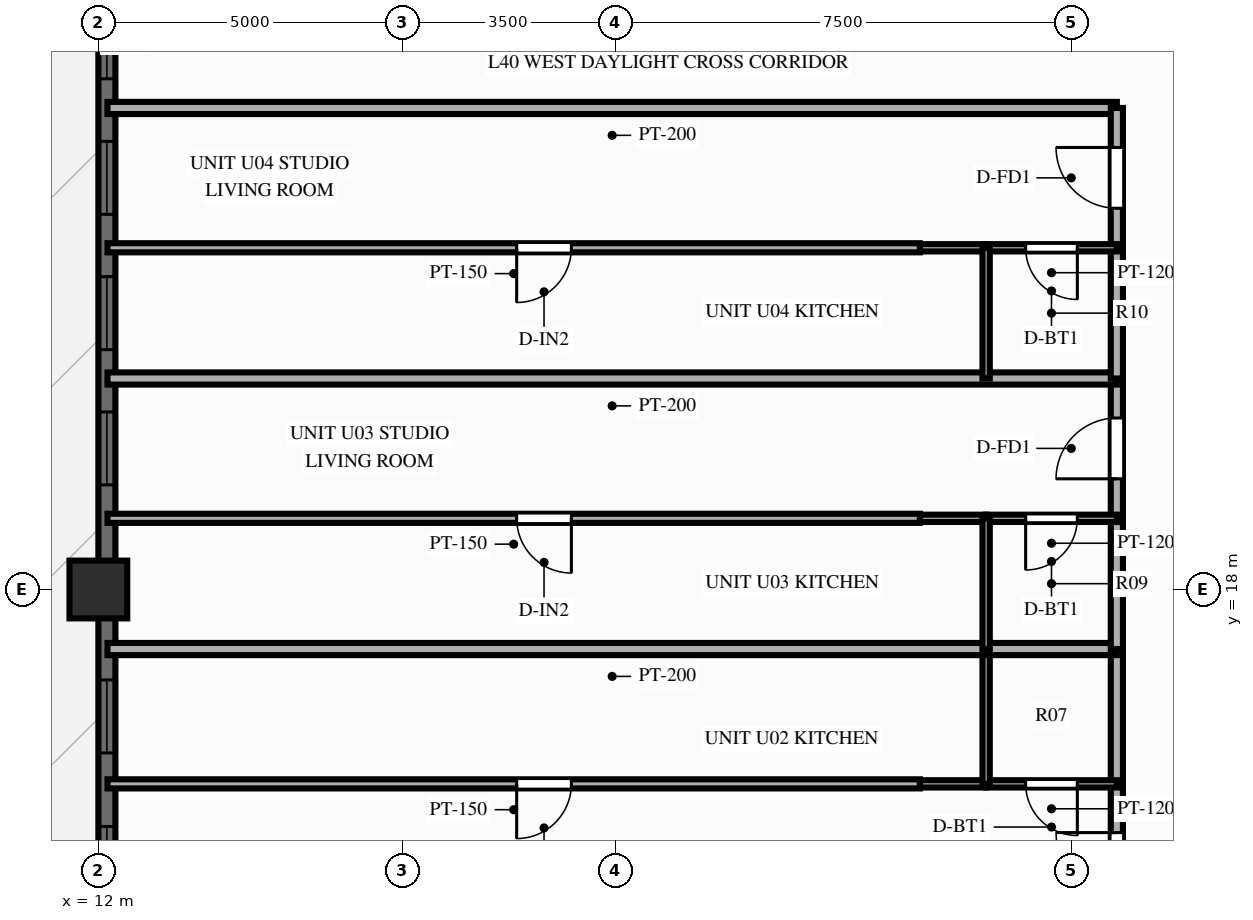
"""IFC4 building model, lengths in metres.
Left out: names, types, materials, properties, quantities, classifications, styles, units other than length and angle.
Written with IfcOpenShell. Run it as: python <this file> out.ifc"""

import sys

from ifc_helpers import new_model, si_unit, direction, frame, frame_2d, origin, origin_2d, place, context, subcontext, project, spatial, rectangle, extrude, source, transform, mapped, element, fill, save


model = new_model("IFC4")
c1 = context("Model", 3, precision=1e-05, world=origin(), true_north=direction((0.0, 1.0)))
c2 = subcontext(c1, "Body", "Model", "MODEL_VIEW")
j1 = project(units=[si_unit("LENGTHUNIT", "METRE"), si_unit("PLANEANGLEUNIT", "RADIAN")], contexts=[c1])
p1 = place(None, origin())
s1 = spatial("IfcSite", under=j1, at=p1, CompositionType="ELEMENT")
p2 = place(p1, origin())
s2 = spatial("IfcBuilding", under=s1, at=p2, CompositionType="ELEMENT")
p3 = place(p2, frame((0.0, 0.0, 126.75)))
s3 = spatial("IfcBuildingStorey", under=s2, at=p3, CompositionType="ELEMENT", Elevation=126.75)
m1 = source(origin(), c2, "Body", "SweptSolid", [
    extrude(rectangle(XDim=0.95, YDim=0.95, at=origin_2d()), origin(), (0.0, 0.0, 1.0), 3.0),
])
p4 = place(p3, frame((12.0, 18.0, 0.0), z_axis=(0.0, 0.0, 1.0), x_axis=(1.0, 0.0, 0.0)))
e1 = element("IfcColumn", 1, at=p4, inside=s3, PredefinedType="COLUMN", context=c2, shape_type="MappedRepresentation", body=[
    mapped(m1, transform((0.0, 0.0, 0.0), scale=1.0)),
])
p5 = place(p3, frame((12.14, 7.2, 0.0), z_axis=(0.0, 0.0, 1.0), x_axis=(0.0, 1.0, 0.0)))
e2 = element("IfcWall", 2, at=p5, inside=s3, PredefinedType="SOLIDWALL", context=c2, shape_type="SweptSolid", body=[
    extrude(rectangle(XDim=39.6, YDim=0.28, at=frame_2d((19.8, 0.0))), origin(), (0.0, 0.0, 1.0), 2.28),
])
p6 = place(p5, frame((0.949, 0.0, 0.25)))
e3 = element("IfcOpeningElement", 3, at=p6, cuts=e2, PredefinedType="OPENING", context=c2, shape_type="SweptSolid", body=[
    extrude(rectangle(XDim=1.2, YDim=1.5, at=frame_2d((0.6, 0.75))), frame((0.0, 0.152, 0.0), z_axis=(0.0, -1.0, 0.0), x_axis=(1.0, 0.0, 0.0)), (0.0, 0.0, 1.0), 0.304),
])
p7 = place(p5, frame((3.292, 0.0, 0.25)))
e4 = element("IfcOpeningElement", 4, at=p7, cuts=e2, PredefinedType="OPENING", context=c2, shape_type="SweptSolid", body=[
    extrude(rectangle(XDim=1.2, YDim=1.5, at=frame_2d((0.6, 0.75))), frame((0.0, 0.152, 0.0), z_axis=(0.0, -1.0, 0.0), x_axis=(1.0, 0.0, 0.0)), (0.0, 0.0, 1.0), 0.304),
])
p8 = place(p5, frame((5.702, 0.0, 0.25)))
e5 = element("IfcOpeningElement", 5, at=p8, cuts=e2, PredefinedType="OPENING", context=c2, shape_type="SweptSolid", body=[
    extrude(rectangle(XDim=1.2, YDim=1.5, at=frame_2d((0.6, 0.75))), frame((0.0, 0.152, 0.0), z_axis=(0.0, -1.0, 0.0), x_axis=(1.0, 0.0, 0.0)), (0.0, 0.0, 1.0), 0.304),
])
p9 = place(p5, frame((8.112, 0.0, 0.25)))
e6 = element("IfcOpeningElement", 6, at=p9, cuts=e2, PredefinedType="OPENING", context=c2, shape_type="SweptSolid", body=[
    extrude(rectangle(XDim=1.2, YDim=1.5, at=frame_2d((0.6, 0.75))), frame((0.0, 0.152, 0.0), z_axis=(0.0, -1.0, 0.0), x_axis=(1.0, 0.0, 0.0)), (0.0, 0.0, 1.0), 0.304),
])
p10 = place(p5, frame((12.521, 0.0, 0.25)))
e7 = element("IfcOpeningElement", 7, at=p10, cuts=e2, PredefinedType="OPENING", context=c2, shape_type="SweptSolid", body=[
    extrude(rectangle(XDim=1.2, YDim=1.5, at=frame_2d((0.6, 0.75))), frame((0.0, 0.152, 0.0), z_axis=(0.0, -1.0, 0.0), x_axis=(1.0, 0.0, 0.0)), (0.0, 0.0, 1.0), 0.304),
])
p11 = place(p5, frame((14.745, 0.0, 0.25)))
e8 = element("IfcOpeningElement", 8, at=p11, cuts=e2, PredefinedType="OPENING", context=c2, shape_type="SweptSolid", body=[
    extrude(rectangle(XDim=1.2, YDim=1.5, at=frame_2d((0.6, 0.75))), frame((0.0, 0.152, 0.0), z_axis=(0.0, -1.0, 0.0), x_axis=(1.0, 0.0, 0.0)), (0.0, 0.0, 1.0), 0.304),
])
p12 = place(p5, frame((16.97, 0.0, 0.25)))
e9 = element("IfcOpeningElement", 9, at=p12, cuts=e2, PredefinedType="OPENING", context=c2, shape_type="SweptSolid", body=[
    extrude(rectangle(XDim=1.2, YDim=1.5, at=frame_2d((0.6, 0.75))), frame((0.0, 0.152, 0.0), z_axis=(0.0, -1.0, 0.0), x_axis=(1.0, 0.0, 0.0)), (0.0, 0.0, 1.0), 0.304),
])
p13 = place(p5, frame((19.2, 0.0, 0.25)))
e10 = element("IfcOpeningElement", 10, at=p13, cuts=e2, PredefinedType="OPENING", context=c2, shape_type="SweptSolid", body=[
    extrude(rectangle(XDim=1.2, YDim=1.5, at=frame_2d((0.6, 0.75))), frame((0.0, 0.152, 0.0), z_axis=(0.0, -1.0, 0.0), x_axis=(1.0, 0.0, 0.0)), (0.0, 0.0, 1.0), 0.304),
])
p14 = place(p5, frame((21.578, 0.0, 0.25)))
e11 = element("IfcOpeningElement", 11, at=p14, cuts=e2, PredefinedType="OPENING", context=c2, shape_type="SweptSolid", body=[
    extrude(rectangle(XDim=1.2, YDim=1.5, at=frame_2d((0.6, 0.75))), frame((0.0, 0.152, 0.0), z_axis=(0.0, -1.0, 0.0), x_axis=(1.0, 0.0, 0.0)), (0.0, 0.0, 1.0), 0.304),
])
p15 = place(p5, frame((24.713, 0.0, 0.0)))
e12 = element("IfcOpeningElement", 12, at=p15, cuts=e2, PredefinedType="OPENING", context=c2, shape_type="SweptSolid", body=[
    extrude(rectangle(XDim=1.6, YDim=2.15, at=frame_2d((0.8, 1.075))), frame((0.0, 0.152, 0.0), z_axis=(0.0, -1.0, 0.0), x_axis=(1.0, 0.0, 0.0)), (0.0, 0.0, 1.0), 0.304),
])
p16 = place(p5, frame((29.305, 0.0, 0.25)))
e13 = element("IfcOpeningElement", 13, at=p16, cuts=e2, PredefinedType="OPENING", context=c2, shape_type="SweptSolid", body=[
    extrude(rectangle(XDim=0.7, YDim=1.5, at=frame_2d((0.35, 0.75))), frame((0.0, 0.152, 0.0), z_axis=(0.0, -1.0, 0.0), x_axis=(1.0, 0.0, 0.0)), (0.0, 0.0, 1.0), 0.304),
])
p17 = place(p5, frame((30.848, 0.0, 0.25)))
e14 = element("IfcOpeningElement", 14, at=p17, cuts=e2, PredefinedType="OPENING", context=c2, shape_type="SweptSolid", body=[
    extrude(rectangle(XDim=1.2, YDim=1.5, at=frame_2d((0.6, 0.75))), frame((0.0, 0.152, 0.0), z_axis=(0.0, -1.0, 0.0), x_axis=(1.0, 0.0, 0.0)), (0.0, 0.0, 1.0), 0.304),
])
p18 = place(p5, frame((34.183, 0.0, 0.25)))
e15 = element("IfcOpeningElement", 15, at=p18, cuts=e2, PredefinedType="OPENING", context=c2, shape_type="SweptSolid", body=[
    extrude(rectangle(XDim=1.2, YDim=1.5, at=frame_2d((0.6, 0.75))), frame((0.0, 0.152, 0.0), z_axis=(0.0, -1.0, 0.0), x_axis=(1.0, 0.0, 0.0)), (0.0, 0.0, 1.0), 0.304),
])
p19 = place(p5, frame((37.452, 0.0, 0.25)))
e16 = element("IfcOpeningElement", 16, at=p19, cuts=e2, PredefinedType="OPENING", context=c2, shape_type="SweptSolid", body=[
    extrude(rectangle(XDim=1.2, YDim=1.5, at=frame_2d((0.6, 0.75))), frame((0.0, 0.152, 0.0), z_axis=(0.0, -1.0, 0.0), x_axis=(1.0, 0.0, 0.0)), (0.0, 0.0, 1.0), 0.304),
])
p20 = place(p3, frame((28.75, 25.92, 0.0), z_axis=(0.0, 0.0, 1.0), x_axis=(-1.0, 0.0, 0.0)))
e17 = element("IfcWall", 17, at=p20, inside=s3, PredefinedType="PARTITIONING", context=c2, shape_type="SweptSolid", body=[
    extrude(rectangle(XDim=16.6, YDim=0.2, at=frame_2d((8.3, 0.0))), origin(), (0.0, 0.0, 1.0), 2.79),
])
p21 = place(p3, frame((28.75, 12.2, 0.0), z_axis=(0.0, 0.0, 1.0), x_axis=(0.0, 1.0, 0.0)))
e18 = element("IfcWall", 18, at=p21, inside=s3, PredefinedType="PARTITIONING", context=c2, shape_type="SweptSolid", body=[
    extrude(rectangle(XDim=2.603, YDim=0.2, at=frame_2d((1.302, 0.0))), origin(), (0.0, 0.0, 1.0), 2.79),
])
p22 = place(p21, frame((0.802, 0.0, 0.0)))
e19 = element("IfcOpeningElement", 19, at=p22, cuts=e18, PredefinedType="OPENING", context=c2, shape_type="SweptSolid", body=[
    extrude(rectangle(XDim=1.0, YDim=2.15, at=frame_2d((0.5, 1.075))), frame((0.0, 0.112, 0.0), z_axis=(0.0, -1.0, 0.0), x_axis=(1.0, 0.0, 0.0)), (0.0, 0.0, 1.0), 0.224),
])
p23 = place(p3, frame((28.75, 14.803, 0.0), z_axis=(0.0, 0.0, 1.0), x_axis=(0.0, 1.0, 0.0)))
e20 = element("IfcWall", 20, at=p23, inside=s3, PredefinedType="PARTITIONING", context=c2, shape_type="SweptSolid", body=[
    extrude(rectangle(XDim=2.217, YDim=0.2, at=frame_2d((1.109, 0.0))), origin(), (0.0, 0.0, 1.0), 2.79),
])
p24 = place(p3, frame((28.75, 14.803, 0.0), z_axis=(0.0, 0.0, 1.0), x_axis=(-1.0, 0.0, 0.0)))
e21 = element("IfcWall", 21, at=p24, inside=s3, PredefinedType="PARTITIONING", context=c2, shape_type="SweptSolid", body=[
    extrude(rectangle(XDim=2.15, YDim=0.12, at=frame_2d((1.075, 0.0))), origin(), (0.0, 0.0, 1.0), 2.79),
])
p25 = place(p24, frame((0.65, 0.0, 0.0)))
e22 = element("IfcOpeningElement", 22, at=p25, cuts=e21, PredefinedType="OPENING", context=c2, shape_type="SweptSolid", body=[
    extrude(rectangle(XDim=0.85, YDim=2.05, at=frame_2d((0.425, 1.025))), frame((0.0, 0.072, 0.0), z_axis=(0.0, -1.0, 0.0), x_axis=(1.0, 0.0, 0.0)), (0.0, 0.0, 1.0), 0.144),
])
p26 = place(p3, frame((26.6, 14.803, 0.0), z_axis=(0.0, 0.0, 1.0), x_axis=(-1.0, 0.0, 0.0)))
e23 = element("IfcWall", 23, at=p26, inside=s3, PredefinedType="PARTITIONING", context=c2, shape_type="SweptSolid", body=[
    extrude(rectangle(XDim=1.09, YDim=0.12, at=frame_2d((0.545, 0.0))), origin(), (0.0, 0.0, 1.0), 2.79),
])
p27 = place(p3, frame((26.6, 14.803, 0.0), z_axis=(0.0, 0.0, 1.0), x_axis=(0.0, 1.0, 0.0)))
e24 = element("IfcWall", 24, at=p27, inside=s3, PredefinedType="PARTITIONING", context=c2, shape_type="SweptSolid", body=[
    extrude(rectangle(XDim=2.217, YDim=0.12, at=frame_2d((1.109, 0.0))), origin(), (0.0, 0.0, 1.0), 2.79),
])
p28 = place(p3, frame((25.51, 14.803, 0.0), z_axis=(0.0, 0.0, 1.0), x_axis=(-1.0, 0.0, 0.0)))
e25 = element("IfcWall", 25, at=p28, inside=s3, PredefinedType="PARTITIONING", context=c2, shape_type="SweptSolid", body=[
    extrude(rectangle(XDim=13.36, YDim=0.15, at=frame_2d((6.68, 0.0))), origin(), (0.0, 0.0, 1.0), 2.79),
])
p29 = place(p28, frame((5.731, 0.0, 0.0)))
e26 = element("IfcOpeningElement", 26, at=p29, cuts=e25, PredefinedType="OPENING", context=c2, shape_type="SweptSolid", body=[
    extrude(rectangle(XDim=0.9, YDim=2.1, at=frame_2d((0.45, 1.05))), frame((0.0, 0.087, 0.0), z_axis=(0.0, -1.0, 0.0), x_axis=(1.0, 0.0, 0.0)), (0.0, 0.0, 1.0), 0.174),
])
p30 = place(p3, frame((28.75, 17.021, 0.0), z_axis=(0.0, 0.0, 1.0), x_axis=(-1.0, 0.0, 0.0)))
e27 = element("IfcWall", 27, at=p30, inside=s3, PredefinedType="PARTITIONING", context=c2, shape_type="SweptSolid", body=[
    extrude(rectangle(XDim=16.6, YDim=0.2, at=frame_2d((8.3, 0.0))), origin(), (0.0, 0.0, 1.0), 2.34),
])
p31 = place(p3, frame((28.75, 17.021, 0.0), z_axis=(0.0, 0.0, 1.0), x_axis=(0.0, 1.0, 0.0)))
e28 = element("IfcWall", 28, at=p31, inside=s3, PredefinedType="PARTITIONING", context=c2, shape_type="SweptSolid", body=[
    extrude(rectangle(XDim=2.15, YDim=0.2, at=frame_2d((1.075, 0.0))), origin(), (0.0, 0.0, 1.0), 2.79),
])
p32 = place(p3, frame((28.75, 19.171, 0.0), z_axis=(0.0, 0.0, 1.0), x_axis=(0.0, 1.0, 0.0)))
e29 = element("IfcWall", 29, at=p32, inside=s3, PredefinedType="PARTITIONING", context=c2, shape_type="SweptSolid", body=[
    extrude(rectangle(XDim=2.3, YDim=0.2, at=frame_2d((1.15, 0.0))), origin(), (0.0, 0.0, 1.0), 2.79),
])
p33 = place(p32, frame((0.65, 0.0, 0.0)))
e30 = element("IfcOpeningElement", 30, at=p33, cuts=e29, PredefinedType="OPENING", context=c2, shape_type="SweptSolid", body=[
    extrude(rectangle(XDim=1.0, YDim=2.15, at=frame_2d((0.5, 1.075))), frame((0.0, 0.112, 0.0), z_axis=(0.0, -1.0, 0.0), x_axis=(1.0, 0.0, 0.0)), (0.0, 0.0, 1.0), 0.224),
])
p34 = place(p3, frame((28.75, 19.171, 0.0), z_axis=(0.0, 0.0, 1.0), x_axis=(-1.0, 0.0, 0.0)))
e31 = element("IfcWall", 31, at=p34, inside=s3, PredefinedType="PARTITIONING", context=c2, shape_type="SweptSolid", body=[
    extrude(rectangle(XDim=2.15, YDim=0.12, at=frame_2d((1.075, 0.0))), origin(), (0.0, 0.0, 1.0), 2.79),
])
p35 = place(p34, frame((0.65, 0.0, 0.0)))
e32 = element("IfcOpeningElement", 32, at=p35, cuts=e31, PredefinedType="OPENING", context=c2, shape_type="SweptSolid", body=[
    extrude(rectangle(XDim=0.85, YDim=2.05, at=frame_2d((0.425, 1.025))), frame((0.0, 0.072, 0.0), z_axis=(0.0, -1.0, 0.0), x_axis=(1.0, 0.0, 0.0)), (0.0, 0.0, 1.0), 0.144),
])
p36 = place(p3, frame((26.6, 19.171, 0.0), z_axis=(0.0, 0.0, 1.0), x_axis=(-1.0, 0.0, 0.0)))
e33 = element("IfcWall", 33, at=p36, inside=s3, PredefinedType="PARTITIONING", context=c2, shape_type="SweptSolid", body=[
    extrude(rectangle(XDim=1.09, YDim=0.12, at=frame_2d((0.545, 0.0))), origin(), (0.0, 0.0, 1.0), 2.79),
])
p37 = place(p3, frame((26.6, 17.021, 0.0), z_axis=(0.0, 0.0, 1.0), x_axis=(0.0, 1.0, 0.0)))
e34 = element("IfcWall", 34, at=p37, inside=s3, PredefinedType="PARTITIONING", context=c2, shape_type="SweptSolid", body=[
    extrude(rectangle(XDim=2.15, YDim=0.12, at=frame_2d((1.075, 0.0))), origin(), (0.0, 0.0, 1.0), 2.79),
])
p38 = place(p3, frame((25.51, 19.171, 0.0), z_axis=(0.0, 0.0, 1.0), x_axis=(-1.0, 0.0, 0.0)))
e35 = element("IfcWall", 35, at=p38, inside=s3, PredefinedType="PARTITIONING", context=c2, shape_type="SweptSolid", body=[
    extrude(rectangle(XDim=13.36, YDim=0.15, at=frame_2d((6.68, 0.0))), origin(), (0.0, 0.0, 1.0), 2.79),
])
p39 = place(p38, frame((5.731, 0.0, 0.0)))
e36 = element("IfcOpeningElement", 36, at=p39, cuts=e35, PredefinedType="OPENING", context=c2, shape_type="SweptSolid", body=[
    extrude(rectangle(XDim=0.9, YDim=2.1, at=frame_2d((0.45, 1.05))), frame((0.0, 0.087, 0.0), z_axis=(0.0, -1.0, 0.0), x_axis=(1.0, 0.0, 0.0)), (0.0, 0.0, 1.0), 0.174),
])
p40 = place(p3, frame((28.75, 21.47, 0.0), z_axis=(0.0, 0.0, 1.0), x_axis=(-1.0, 0.0, 0.0)))
e37 = element("IfcWall", 37, at=p40, inside=s3, PredefinedType="PARTITIONING", context=c2, shape_type="SweptSolid", body=[
    extrude(rectangle(XDim=16.6, YDim=0.2, at=frame_2d((8.3, 0.0))), origin(), (0.0, 0.0, 1.0), 2.79),
])
p41 = place(p3, frame((28.75, 21.47, 0.0), z_axis=(0.0, 0.0, 1.0), x_axis=(0.0, 1.0, 0.0)))
e38 = element("IfcWall", 38, at=p41, inside=s3, PredefinedType="PARTITIONING", context=c2, shape_type="SweptSolid", body=[
    extrude(rectangle(XDim=2.15, YDim=0.2, at=frame_2d((1.075, 0.0))), origin(), (0.0, 0.0, 1.0), 2.79),
])
p42 = place(p3, frame((28.75, 23.62, 0.0), z_axis=(0.0, 0.0, 1.0), x_axis=(0.0, 1.0, 0.0)))
e39 = element("IfcWall", 39, at=p42, inside=s3, PredefinedType="PARTITIONING", context=c2, shape_type="SweptSolid", body=[
    extrude(rectangle(XDim=2.3, YDim=0.2, at=frame_2d((1.15, 0.0))), origin(), (0.0, 0.0, 1.0), 2.79),
])
p43 = place(p42, frame((0.65, 0.0, 0.0)))
e40 = element("IfcOpeningElement", 40, at=p43, cuts=e39, PredefinedType="OPENING", context=c2, shape_type="SweptSolid", body=[
    extrude(rectangle(XDim=1.0, YDim=2.15, at=frame_2d((0.5, 1.075))), frame((0.0, 0.112, 0.0), z_axis=(0.0, -1.0, 0.0), x_axis=(1.0, 0.0, 0.0)), (0.0, 0.0, 1.0), 0.224),
])
p44 = place(p3, frame((28.75, 23.62, 0.0), z_axis=(0.0, 0.0, 1.0), x_axis=(-1.0, 0.0, 0.0)))
e41 = element("IfcWall", 41, at=p44, inside=s3, PredefinedType="PARTITIONING", context=c2, shape_type="SweptSolid", body=[
    extrude(rectangle(XDim=2.15, YDim=0.12, at=frame_2d((1.075, 0.0))), origin(), (0.0, 0.0, 1.0), 2.79),
])
p45 = place(p44, frame((0.65, 0.0, 0.0)))
e42 = element("IfcOpeningElement", 42, at=p45, cuts=e41, PredefinedType="OPENING", context=c2, shape_type="SweptSolid", body=[
    extrude(rectangle(XDim=0.85, YDim=2.05, at=frame_2d((0.425, 1.025))), frame((0.0, 0.072, 0.0), z_axis=(0.0, -1.0, 0.0), x_axis=(1.0, 0.0, 0.0)), (0.0, 0.0, 1.0), 0.144),
])
p46 = place(p3, frame((26.6, 23.62, 0.0), z_axis=(0.0, 0.0, 1.0), x_axis=(-1.0, 0.0, 0.0)))
e43 = element("IfcWall", 43, at=p46, inside=s3, PredefinedType="PARTITIONING", context=c2, shape_type="SweptSolid", body=[
    extrude(rectangle(XDim=1.09, YDim=0.12, at=frame_2d((0.545, 0.0))), origin(), (0.0, 0.0, 1.0), 2.79),
])
p47 = place(p3, frame((26.6, 21.47, 0.0), z_axis=(0.0, 0.0, 1.0), x_axis=(0.0, 1.0, 0.0)))
e44 = element("IfcWall", 44, at=p47, inside=s3, PredefinedType="PARTITIONING", context=c2, shape_type="SweptSolid", body=[
    extrude(rectangle(XDim=2.15, YDim=0.12, at=frame_2d((1.075, 0.0))), origin(), (0.0, 0.0, 1.0), 2.79),
])
p48 = place(p3, frame((25.51, 23.62, 0.0), z_axis=(0.0, 0.0, 1.0), x_axis=(-1.0, 0.0, 0.0)))
e45 = element("IfcWall", 45, at=p48, inside=s3, PredefinedType="PARTITIONING", context=c2, shape_type="SweptSolid", body=[
    extrude(rectangle(XDim=13.36, YDim=0.15, at=frame_2d((6.68, 0.0))), origin(), (0.0, 0.0, 1.0), 2.79),
])
p49 = place(p48, frame((5.731, 0.0, 0.0)))
e46 = element("IfcOpeningElement", 46, at=p49, cuts=e45, PredefinedType="OPENING", context=c2, shape_type="SweptSolid", body=[
    extrude(rectangle(XDim=0.9, YDim=2.1, at=frame_2d((0.45, 1.05))), frame((0.0, 0.087, 0.0), z_axis=(0.0, -1.0, 0.0), x_axis=(1.0, 0.0, 0.0)), (0.0, 0.0, 1.0), 0.174),
])
m2 = source(origin(), c2, "Body", "SweptSolid", [
    extrude(rectangle(XDim=1.2, YDim=1.5, at=frame_2d((0.6, 0.75))), frame((0.0, 0.03, 0.0), z_axis=(0.0, -1.0, 0.0), x_axis=(1.0, 0.0, 0.0)), (0.0, 0.0, 1.0), 0.06),
])
p50 = place(p8, origin())
e47 = element("IfcWindow", 47, at=p50, inside=s3, PartitioningType="SINGLE_PANEL", PredefinedType="WINDOW", context=c2, shape_type="MappedRepresentation", body=[
    mapped(m2, transform((0.0, 0.0, 0.0), scale=1.0)),
])
fill(e5, e47)
p51 = place(p9, origin())
e48 = element("IfcWindow", 48, at=p51, inside=s3, PartitioningType="SINGLE_PANEL", PredefinedType="WINDOW", context=c2, shape_type="MappedRepresentation", body=[
    mapped(m2, transform((0.0, 0.0, 0.0), scale=1.0)),
])
fill(e6, e48)
p52 = place(p10, origin())
e49 = element("IfcWindow", 49, at=p52, inside=s3, PartitioningType="SINGLE_PANEL", PredefinedType="WINDOW", context=c2, shape_type="MappedRepresentation", body=[
    mapped(m2, transform((0.0, 0.0, 0.0), scale=1.0)),
])
fill(e7, e49)
p53 = place(p11, origin())
e50 = element("IfcWindow", 50, at=p53, inside=s3, PartitioningType="SINGLE_PANEL", PredefinedType="WINDOW", context=c2, shape_type="MappedRepresentation", body=[
    mapped(m2, transform((0.0, 0.0, 0.0), scale=1.0)),
])
fill(e8, e50)
p54 = place(p12, origin())
e51 = element("IfcWindow", 51, at=p54, inside=s3, PartitioningType="SINGLE_PANEL", PredefinedType="WINDOW", context=c2, shape_type="MappedRepresentation", body=[
    mapped(m2, transform((0.0, 0.0, 0.0), scale=1.0)),
])
fill(e9, e51)
p55 = place(p13, origin())
e52 = element("IfcWindow", 52, at=p55, inside=s3, PartitioningType="SINGLE_PANEL", PredefinedType="WINDOW", context=c2, shape_type="MappedRepresentation", body=[
    mapped(m2, transform((0.0, 0.0, 0.0), scale=1.0)),
])
fill(e10, e52)
m3 = source(origin(), c2, "Body", "SweptSolid", [
    extrude(rectangle(XDim=1.0, YDim=2.15, at=frame_2d((0.5, 1.075))), frame((0.0, 0.025, 0.0), z_axis=(0.0, -1.0, 0.0), x_axis=(1.0, 0.0, 0.0)), (0.0, 0.0, 1.0), 0.05),
])
p56 = place(p22, origin())
e53 = element("IfcDoor", 53, at=p56, inside=s3, OperationType="SINGLE_SWING_RIGHT", PredefinedType="DOOR", context=c2, shape_type="MappedRepresentation", body=[
    mapped(m3, transform((0.0, 0.0, 0.0), scale=1.0)),
])
fill(e19, e53)
m4 = source(origin(), c2, "Body", "SweptSolid", [
    extrude(rectangle(XDim=0.85, YDim=2.05, at=frame_2d((0.425, 1.025))), frame((0.0, 0.025, 0.0), z_axis=(0.0, -1.0, 0.0), x_axis=(1.0, 0.0, 0.0)), (0.0, 0.0, 1.0), 0.05),
])
p57 = place(p25, origin())
e54 = element("IfcDoor", 54, at=p57, inside=s3, OperationType="SINGLE_SWING_LEFT", PredefinedType="DOOR", context=c2, shape_type="MappedRepresentation", body=[
    mapped(m4, transform((0.0, 0.0, 0.0), scale=1.0)),
])
fill(e22, e54)
m5 = source(origin(), c2, "Body", "SweptSolid", [
    extrude(rectangle(XDim=0.9, YDim=2.1, at=frame_2d((0.45, 1.05))), frame((0.0, 0.025, 0.0), z_axis=(0.0, -1.0, 0.0), x_axis=(1.0, 0.0, 0.0)), (0.0, 0.0, 1.0), 0.05),
])
p58 = place(p29, origin())
e55 = element("IfcDoor", 55, at=p58, inside=s3, OperationType="SINGLE_SWING_RIGHT", PredefinedType="DOOR", context=c2, shape_type="MappedRepresentation", body=[
    mapped(m5, transform((0.0, 0.0, 0.0), scale=1.0)),
])
fill(e26, e55)
p59 = place(p33, origin())
e56 = element("IfcDoor", 56, at=p59, inside=s3, OperationType="SINGLE_SWING_LEFT", PredefinedType="DOOR", context=c2, shape_type="MappedRepresentation", body=[
    mapped(m3, transform((0.0, 0.0, 0.0), scale=1.0)),
])
fill(e30, e56)
p60 = place(p35, origin())
e57 = element("IfcDoor", 57, at=p60, inside=s3, OperationType="SINGLE_SWING_RIGHT", PredefinedType="DOOR", context=c2, shape_type="MappedRepresentation", body=[
    mapped(m4, transform((0.0, 0.0, 0.0), scale=1.0)),
])
fill(e32, e57)
p61 = place(p39, origin())
e58 = element("IfcDoor", 58, at=p61, inside=s3, OperationType="SINGLE_SWING_LEFT", PredefinedType="DOOR", context=c2, shape_type="MappedRepresentation", body=[
    mapped(m5, transform((0.0, 0.0, 0.0), scale=1.0)),
])
fill(e36, e58)
p62 = place(p43, origin())
e59 = element("IfcDoor", 59, at=p62, inside=s3, OperationType="SINGLE_SWING_RIGHT", PredefinedType="DOOR", context=c2, shape_type="MappedRepresentation", body=[
    mapped(m3, transform((0.0, 0.0, 0.0), scale=1.0)),
])
fill(e40, e59)
p63 = place(p45, origin())
e60 = element("IfcDoor", 60, at=p63, inside=s3, OperationType="SINGLE_SWING_LEFT", PredefinedType="DOOR", context=c2, shape_type="MappedRepresentation", body=[
    mapped(m4, transform((0.0, 0.0, 0.0), scale=1.0)),
])
fill(e42, e60)
p64 = place(p49, origin())
e61 = element("IfcDoor", 61, at=p64, inside=s3, OperationType="SINGLE_SWING_RIGHT", PredefinedType="DOOR", context=c2, shape_type="MappedRepresentation", body=[
    mapped(m5, transform((0.0, 0.0, 0.0), scale=1.0)),
])
fill(e46, e61)
save(model, sys.argv[1])
